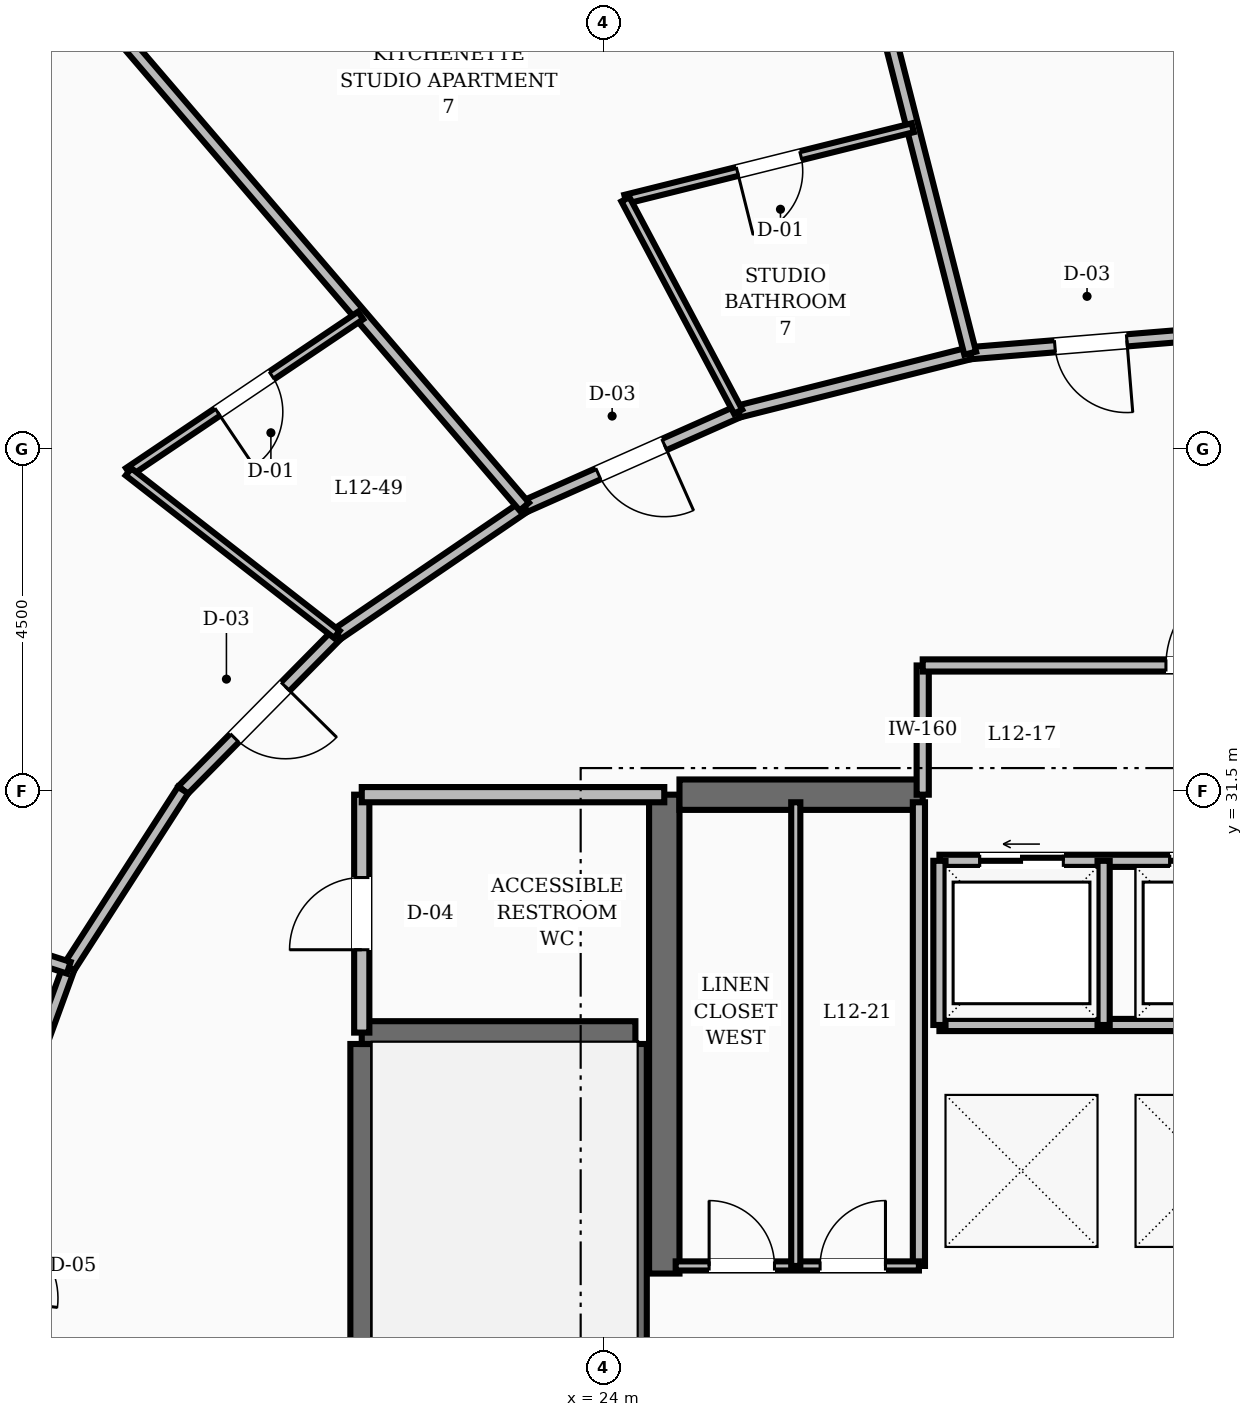
"""IFC4 building model, lengths in metres.
Left out: names, types, materials, properties, quantities, classifications, styles, units other than length and angle.
Written with IfcOpenShell. Run it as: python <this file> out.ifc"""

import sys

from ifc_helpers import new_model, si_unit, direction, frame, frame_2d, origin, place, context, subcontext, project, spatial, rectangle, extrude, element, fill, save


model = new_model("IFC4")
c1 = context("Model", 3, precision=1e-05, world=origin(), true_north=direction((0.0, 1.0)))
c2 = subcontext(c1, "Body", "Model", "MODEL_VIEW")
j1 = project(units=[si_unit("LENGTHUNIT", "METRE"), si_unit("PLANEANGLEUNIT", "RADIAN")], contexts=[c1])
p1 = place(None, origin())
s1 = spatial("IfcSite", under=j1, at=p1, CompositionType="ELEMENT")
p2 = place(p1, origin())
s2 = spatial("IfcBuilding", under=s1, at=p2, CompositionType="ELEMENT")
p3 = place(p2, frame((0.0, 0.0, 52.0)))
s3 = spatial("IfcBuildingStorey", under=s2, at=p3, CompositionType="ELEMENT", Elevation=52.0)
p4 = place(p3, frame((24.8, 25.15, 0.0), z_axis=(0.0, 0.0, 1.0), x_axis=(0.0, 1.0, 0.0)))
e1 = element("IfcWall", 1, at=p4, inside=s3, PredefinedType="SHEAR", context=c2, shape_type="SweptSolid", body=[
    extrude(rectangle(XDim=6.3, YDim=0.4, at=frame_2d((3.15, 0.0))), origin(), (0.0, 0.0, 1.0), 3.6),
])
p5 = place(p3, frame((25.0, 31.45, 0.0), z_axis=(0.0, 0.0, 1.0), x_axis=(1.0, 0.0, 0.0)))
e2 = element("IfcWall", 2, at=p5, inside=s3, PredefinedType="SHEAR", context=c2, shape_type="SweptSolid", body=[
    extrude(rectangle(XDim=3.2, YDim=0.4, at=frame_2d((1.6, 0.0))), origin(), (0.0, 0.0, 1.0), 3.6),
])
for number, where, z_axis, x_axis in (
    (3, (20.82, 19.43, 0.0), (0.0, 0.0, 1.0), (0.0, 1.0, 0.0)),
    (4, (24.42, 19.43, 0.0), (0.0, 0.0, 1.0), (0.0, 1.0, 0.0)),
):
    element("IfcWall", number, at=place(p3, frame(where, z_axis=z_axis, x_axis=x_axis)), inside=s3, PredefinedType="SHEAR", context=c2, shape_type="SweptSolid", body=[
        extrude(rectangle(XDim=8.74, YDim=0.3, at=frame_2d((4.37, 0.0))), origin(), (0.0, 0.0, 1.0), 3.6),
    ])
p6 = place(p3, frame((20.82, 28.32, 0.0), z_axis=(0.0, 0.0, 1.0), x_axis=(1.0, 0.0, 0.0)))
e5 = element("IfcWall", 5, at=p6, inside=s3, PredefinedType="SHEAR", context=c2, shape_type="SweptSolid", body=[
    extrude(rectangle(XDim=3.6, YDim=0.3, at=frame_2d((1.8, 0.0))), origin(), (0.0, 0.0, 1.0), 3.6),
])
p7 = place(p3, frame((17.291, 41.856, 0.0), z_axis=(0.0, 0.0, 1.0), x_axis=(-0.832431966359, -0.554127261, 0.0)))
e6 = element("IfcWall", 6, at=p7, inside=s3, PredefinedType="STANDARD", context=c2, shape_type="SweptSolid", body=[
    extrude(rectangle(XDim=4.82, YDim=0.28, at=frame_2d((2.41, 0.0))), origin(), (0.0, 0.0, 1.0), 2.65),
])
p8 = place(p3, frame((20.82, 28.32, 0.0), z_axis=(0.0, 0.0, 1.0), x_axis=(0.0, 1.0, 0.0)))
e7 = element("IfcWall", 7, at=p8, inside=s3, PredefinedType="SOLIDWALL", context=c2, shape_type="SweptSolid", body=[
    extrude(rectangle(XDim=3.13, YDim=0.2, at=frame_2d((1.565, 0.0))), origin(), (0.0, 0.0, 1.0), 2.61),
])
p9 = place(p8, frame((1.09, 0.0, 0.0)))
e8 = element("IfcOpeningElement", 8, at=p9, cuts=e7, PredefinedType="OPENING", context=c2, shape_type="SweptSolid", body=[
    extrude(rectangle(XDim=0.95, YDim=2.1, at=frame_2d((0.475, 1.05))), frame((0.0, 0.11, 0.0), z_axis=(0.0, -1.0, 0.0), x_axis=(1.0, 0.0, 0.0)), (0.0, 0.0, 1.0), 0.22),
])
p10 = place(p3, frame((20.82, 31.45, 0.0), z_axis=(0.0, 0.0, 1.0), x_axis=(1.0, 0.0, 0.0)))
e9 = element("IfcWall", 9, at=p10, inside=s3, PredefinedType="SOLIDWALL", context=c2, shape_type="SweptSolid", body=[
    extrude(rectangle(XDim=3.98, YDim=0.2, at=frame_2d((1.99, 0.0))), origin(), (0.0, 0.0, 1.0), 2.61),
])
p11 = place(p3, frame((28.42, 30.58, 0.0), z_axis=(0.0, 0.0, 1.0), x_axis=(1.0, 0.0, 0.0)))
e10 = element("IfcWall", 10, at=p11, inside=s3, PredefinedType="SOLIDWALL", context=c2, shape_type="SweptSolid", body=[
    extrude(rectangle(XDim=7.16, YDim=0.16, at=frame_2d((3.58, 0.0))), origin(), (0.0, 0.0, 1.0), 2.61),
])
p12 = place(p11, frame((0.53, 0.0, 0.0)))
e11 = element("IfcOpeningElement", 11, at=p12, cuts=e10, PredefinedType="OPENING", context=c2, shape_type="SweptSolid", body=[
    extrude(rectangle(XDim=1.1, YDim=2.15, at=frame_2d((0.55, 1.075))), frame((0.0, 0.09, 0.0), z_axis=(0.0, -1.0, 0.0), x_axis=(1.0, 0.0, 0.0)), (0.0, 0.0, 1.0), 0.18),
])
p13 = place(p11, frame((3.03, 0.0, 0.0)))
e12 = element("IfcOpeningElement", 12, at=p13, cuts=e10, PredefinedType="OPENING", context=c2, shape_type="SweptSolid", body=[
    extrude(rectangle(XDim=1.1, YDim=2.15, at=frame_2d((0.55, 1.075))), frame((0.0, 0.09, 0.0), z_axis=(0.0, -1.0, 0.0), x_axis=(1.0, 0.0, 0.0)), (0.0, 0.0, 1.0), 0.18),
])
p14 = place(p11, frame((5.53, 0.0, 0.0)))
e13 = element("IfcOpeningElement", 13, at=p14, cuts=e10, PredefinedType="OPENING", context=c2, shape_type="SweptSolid", body=[
    extrude(rectangle(XDim=1.1, YDim=2.15, at=frame_2d((0.55, 1.075))), frame((0.0, 0.09, 0.0), z_axis=(0.0, -1.0, 0.0), x_axis=(1.0, 0.0, 0.0)), (0.0, 0.0, 1.0), 0.18),
])
p15 = place(p3, frame((28.42, 28.42, 0.0), z_axis=(0.0, 0.0, 1.0), x_axis=(1.0, 0.0, 0.0)))
e14 = element("IfcWall", 14, at=p15, inside=s3, PredefinedType="SOLIDWALL", context=c2, shape_type="SweptSolid", body=[
    extrude(rectangle(XDim=7.16, YDim=0.16, at=frame_2d((3.58, 0.0))), origin(), (0.0, 0.0, 1.0), 2.61),
])
for number, where, z_axis, x_axis in (
    (15, (28.42, 28.42, 0.0), (0.0, 0.0, 1.0), (0.0, 1.0, 0.0)),
    (16, (30.58, 28.42, 0.0), (0.0, 0.0, 1.0), (0.0, 1.0, 0.0)),
):
    element("IfcWall", number, at=place(p3, frame(where, z_axis=z_axis, x_axis=x_axis)), inside=s3, PredefinedType="SOLIDWALL", context=c2, shape_type="SweptSolid", body=[
        extrude(rectangle(XDim=2.16, YDim=0.16, at=frame_2d((1.08, 0.0))), origin(), (0.0, 0.0, 1.0), 2.61),
    ])
p16 = place(p3, frame((28.2, 31.45, 0.0), z_axis=(0.0, 0.0, 1.0), x_axis=(0.0, 1.0, 0.0)))
e17 = element("IfcWall", 17, at=p16, inside=s3, PredefinedType="SOLIDWALL", context=c2, shape_type="SweptSolid", body=[
    extrude(rectangle(XDim=1.7, YDim=0.16, at=frame_2d((0.85, 0.0))), origin(), (0.0, 0.0, 1.0), 2.61),
])
p17 = place(p3, frame((28.2, 33.15, 0.0), z_axis=(0.0, 0.0, 1.0), x_axis=(1.0, 0.0, 0.0)))
e18 = element("IfcWall", 18, at=p17, inside=s3, PredefinedType="SOLIDWALL", context=c2, shape_type="SweptSolid", body=[
    extrude(rectangle(XDim=7.6, YDim=0.16, at=frame_2d((3.8, 0.0))), origin(), (0.0, 0.0, 1.0), 2.61),
])
p18 = place(p17, frame((3.2, 0.0, 0.0)))
e19 = element("IfcOpeningElement", 19, at=p18, cuts=e18, PredefinedType="OPENING", context=c2, shape_type="SweptSolid", body=[
    extrude(rectangle(XDim=1.2, YDim=2.1, at=frame_2d((0.6, 1.05))), frame((0.0, 0.09, 0.0), z_axis=(0.0, -1.0, 0.0), x_axis=(1.0, 0.0, 0.0)), (0.0, 0.0, 1.0), 0.18),
])
p19 = place(p3, frame((28.15, 25.25, 0.0), z_axis=(0.0, 0.0, 1.0), x_axis=(0.0, 1.0, 0.0)))
e20 = element("IfcWall", 20, at=p19, inside=s3, PredefinedType="SOLIDWALL", context=c2, shape_type="SweptSolid", body=[
    extrude(rectangle(XDim=6.1, YDim=0.16, at=frame_2d((3.05, 0.0))), origin(), (0.0, 0.0, 1.0), 2.61),
])
p20 = place(p3, frame((24.95, 25.25, 0.0), z_axis=(0.0, 0.0, 1.0), x_axis=(1.0, 0.0, 0.0)))
e21 = element("IfcWall", 21, at=p20, inside=s3, PredefinedType="PARTITIONING", context=c2, shape_type="SweptSolid", body=[
    extrude(rectangle(XDim=3.2, YDim=0.12, at=frame_2d((1.6, 0.0))), origin(), (0.0, 0.0, 1.0), 2.61),
])
p21 = place(p20, frame((0.44, 0.0, 0.0)))
e22 = element("IfcOpeningElement", 22, at=p21, cuts=e21, PredefinedType="OPENING", context=c2, shape_type="SweptSolid", body=[
    extrude(rectangle(XDim=0.86, YDim=2.1, at=frame_2d((0.43, 1.05))), frame((0.0, 0.07, 0.0), z_axis=(0.0, -1.0, 0.0), x_axis=(1.0, 0.0, 0.0)), (0.0, 0.0, 1.0), 0.14),
])
p22 = place(p20, frame((1.9, 0.0, 0.0)))
e23 = element("IfcOpeningElement", 23, at=p22, cuts=e21, PredefinedType="OPENING", context=c2, shape_type="SweptSolid", body=[
    extrude(rectangle(XDim=0.86, YDim=2.1, at=frame_2d((0.43, 1.05))), frame((0.0, 0.07, 0.0), z_axis=(0.0, -1.0, 0.0), x_axis=(1.0, 0.0, 0.0)), (0.0, 0.0, 1.0), 0.14),
])
p23 = place(p3, frame((26.53, 25.25, 0.0), z_axis=(0.0, 0.0, 1.0), x_axis=(0.0, 1.0, 0.0)))
e24 = element("IfcWall", 24, at=p23, inside=s3, PredefinedType="PARTITIONING", context=c2, shape_type="SweptSolid", body=[
    extrude(rectangle(XDim=6.1, YDim=0.12, at=frame_2d((3.05, 0.0))), origin(), (0.0, 0.0, 1.0), 2.61),
])
p24 = place(p3, frame((32.0, 37.518, 0.0), z_axis=(0.0, 0.0, 1.0), x_axis=(-0.996669377538, -0.081548463373, 0.0)))
e25 = element("IfcWall", 25, at=p24, inside=s3, PredefinedType="SOLIDWALL", context=c2, shape_type="SweptSolid", body=[
    extrude(rectangle(XDim=3.185, YDim=0.16, at=frame_2d((1.593, 0.0))), origin(), (0.0, 0.0, 1.0), 2.61),
])
p25 = place(p24, frame((1.118, 0.0, 0.0)))
e26 = element("IfcOpeningElement", 26, at=p25, cuts=e25, PredefinedType="OPENING", context=c2, shape_type="SweptSolid", body=[
    extrude(rectangle(XDim=0.95, YDim=2.1, at=frame_2d((0.475, 1.05))), frame((0.0, 0.09, 0.0), z_axis=(0.0, -1.0, 0.0), x_axis=(1.0, 0.0, 0.0)), (0.0, 0.0, 1.0), 0.18),
])
p26 = place(p3, frame((28.825, 37.258, 0.0), z_axis=(0.0, 0.0, 1.0), x_axis=(-0.969689238064, -0.244341526521, 0.0)))
e27 = element("IfcWall", 27, at=p26, inside=s3, PredefinedType="SOLIDWALL", context=c2, shape_type="SweptSolid", body=[
    extrude(rectangle(XDim=3.148, YDim=0.16, at=frame_2d((1.574, 0.0))), origin(), (0.0, 0.0, 1.0), 2.61),
])
p27 = place(p3, frame((25.772, 36.489, 0.0), z_axis=(0.0, 0.0, 1.0), x_axis=(-0.913952123493, -0.405822024984, 0.0)))
e28 = element("IfcWall", 28, at=p27, inside=s3, PredefinedType="SOLIDWALL", context=c2, shape_type="SweptSolid", body=[
    extrude(rectangle(XDim=3.078, YDim=0.16, at=frame_2d((1.539, 0.0))), origin(), (0.0, 0.0, 1.0), 2.61),
])
p28 = place(p27, frame((1.064, 0.0, 0.0)))
e29 = element("IfcOpeningElement", 29, at=p28, cuts=e28, PredefinedType="OPENING", context=c2, shape_type="SweptSolid", body=[
    extrude(rectangle(XDim=0.95, YDim=2.1, at=frame_2d((0.475, 1.05))), frame((0.0, 0.09, 0.0), z_axis=(0.0, -1.0, 0.0), x_axis=(1.0, 0.0, 0.0)), (0.0, 0.0, 1.0), 0.18),
])
p29 = place(p3, frame((22.959, 35.24, 0.0), z_axis=(0.0, 0.0, 1.0), x_axis=(-0.826293096206, -0.56324037423, 0.0)))
e30 = element("IfcWall", 30, at=p29, inside=s3, PredefinedType="SOLIDWALL", context=c2, shape_type="SweptSolid", body=[
    extrude(rectangle(XDim=2.985, YDim=0.16, at=frame_2d((1.492, 0.0))), origin(), (0.0, 0.0, 1.0), 2.61),
])
p30 = place(p3, frame((20.492, 33.559, 0.0), z_axis=(0.0, 0.0, 1.0), x_axis=(-0.702811997, -0.711375636969, 0.0)))
e31 = element("IfcWall", 31, at=p30, inside=s3, PredefinedType="SOLIDWALL", context=c2, shape_type="SweptSolid", body=[
    extrude(rectangle(XDim=2.879, YDim=0.16, at=frame_2d((1.44, 0.0))), origin(), (0.0, 0.0, 1.0), 2.61),
])
p31 = place(p30, frame((0.965, 0.0, 0.0)))
e32 = element("IfcOpeningElement", 32, at=p31, cuts=e31, PredefinedType="OPENING", context=c2, shape_type="SweptSolid", body=[
    extrude(rectangle(XDim=0.95, YDim=2.1, at=frame_2d((0.475, 1.05))), frame((0.0, 0.09, 0.0), z_axis=(0.0, -1.0, 0.0), x_axis=(1.0, 0.0, 0.0)), (0.0, 0.0, 1.0), 0.18),
])
p32 = place(p3, frame((18.469, 31.51, 0.0), z_axis=(0.0, 0.0, 1.0), x_axis=(-0.541126045017, -0.840941498206, 0.0)))
e33 = element("IfcWall", 33, at=p32, inside=s3, PredefinedType="SOLIDWALL", context=c2, shape_type="SweptSolid", body=[
    extrude(rectangle(XDim=2.779, YDim=0.16, at=frame_2d((1.39, 0.0))), origin(), (0.0, 0.0, 1.0), 2.61),
])
p33 = place(p3, frame((16.965, 29.173, 0.0), z_axis=(0.0, 0.0, 1.0), x_axis=(-0.343013437329, -0.939330496583, 0.0)))
e34 = element("IfcWall", 34, at=p33, inside=s3, PredefinedType="SOLIDWALL", context=c2, shape_type="SweptSolid", body=[
    extrude(rectangle(XDim=2.7, YDim=0.16, at=frame_2d((1.35, 0.0))), origin(), (0.0, 0.0, 1.0), 2.61),
])
p34 = place(p3, frame((28.825, 37.258, 0.0), z_axis=(0.0, 0.0, 1.0), x_axis=(-0.247097489617, 0.968990624632, 0.0)))
e35 = element("IfcWall", 35, at=p34, inside=s3, PredefinedType="SOLIDWALL", context=c2, shape_type="SweptSolid", body=[
    extrude(rectangle(XDim=8.004, YDim=0.16, at=frame_2d((4.002, 0.0))), origin(), (0.0, 0.0, 1.0), 2.61),
])
p35 = place(p3, frame((28.069, 40.224, 0.0), z_axis=(0.0, 0.0, 1.0), x_axis=(-0.970374316044, -0.241606470862, 0.0)))
e36 = element("IfcWall", 36, at=p35, inside=s3, PredefinedType="PARTITIONING", context=c2, shape_type="SweptSolid", body=[
    extrude(rectangle(XDim=3.896, YDim=0.12, at=frame_2d((1.948, 0.0))), origin(), (0.0, 0.0, 1.0), 2.61),
])
p36 = place(p35, frame((1.518, 0.0, 0.0)))
e37 = element("IfcOpeningElement", 37, at=p36, cuts=e36, PredefinedType="OPENING", context=c2, shape_type="SweptSolid", body=[
    extrude(rectangle(XDim=0.86, YDim=2.1, at=frame_2d((0.43, 1.05))), frame((0.0, 0.07, 0.0), z_axis=(0.0, -1.0, 0.0), x_axis=(1.0, 0.0, 0.0)), (0.0, 0.0, 1.0), 0.14),
])
p37 = place(p3, frame((25.772, 36.489, 0.0), z_axis=(0.0, 0.0, 1.0), x_axis=(-0.468968986747, 0.883214633863, 0.0)))
e38 = element("IfcWall", 38, at=p37, inside=s3, PredefinedType="PARTITIONING", context=c2, shape_type="SweptSolid", body=[
    extrude(rectangle(XDim=3.163, YDim=0.12, at=frame_2d((1.582, 0.0))), origin(), (0.0, 0.0, 1.0), 2.61),
])
p38 = place(p3, frame((22.959, 35.24, 0.0), z_axis=(0.0, 0.0, 1.0), x_axis=(-0.650552260828, 0.75946149075, 0.0)))
e39 = element("IfcWall", 39, at=p38, inside=s3, PredefinedType="SOLIDWALL", context=c2, shape_type="SweptSolid", body=[
    extrude(rectangle(XDim=8.662, YDim=0.16, at=frame_2d((4.331, 0.0))), origin(), (0.0, 0.0, 1.0), 2.61),
])
p39 = place(p3, frame((20.805, 37.754, 0.0), z_axis=(0.0, 0.0, 1.0), x_axis=(-0.829367953904, -0.558702780588, 0.0)))
e40 = element("IfcWall", 40, at=p39, inside=s3, PredefinedType="PARTITIONING", context=c2, shape_type="SweptSolid", body=[
    extrude(rectangle(XDim=3.682, YDim=0.12, at=frame_2d((1.841, 0.0))), origin(), (0.0, 0.0, 1.0), 2.61),
])
p40 = place(p39, frame((1.411, 0.0, 0.0)))
e41 = element("IfcOpeningElement", 41, at=p40, cuts=e40, PredefinedType="OPENING", context=c2, shape_type="SweptSolid", body=[
    extrude(rectangle(XDim=0.86, YDim=2.1, at=frame_2d((0.43, 1.05))), frame((0.0, 0.07, 0.0), z_axis=(0.0, -1.0, 0.0), x_axis=(1.0, 0.0, 0.0)), (0.0, 0.0, 1.0), 0.14),
])
p41 = place(p3, frame((20.492, 33.559, 0.0), z_axis=(0.0, 0.0, 1.0), x_axis=(-0.788470290208, 0.615072842401, 0.0)))
e42 = element("IfcWall", 42, at=p41, inside=s3, PredefinedType="PARTITIONING", context=c2, shape_type="SweptSolid", body=[
    extrude(rectangle(XDim=3.476, YDim=0.12, at=frame_2d((1.738, 0.0))), origin(), (0.0, 0.0, 1.0), 2.61),
])
p42 = place(p3, frame((16.965, 29.173, 0.0), z_axis=(0.0, 0.0, 1.0), x_axis=(-0.951563741072, 0.307451535492, 0.0)))
e43 = element("IfcWall", 43, at=p42, inside=s3, PredefinedType="SOLIDWALL", context=c2, shape_type="SweptSolid", body=[
    extrude(rectangle(XDim=9.854, YDim=0.16, at=frame_2d((4.927, 0.0))), origin(), (0.0, 0.0, 1.0), 2.61),
])
p43 = place(p9, origin())
e44 = element("IfcDoor", 44, at=p43, inside=s3, OperationType="SINGLE_SWING_LEFT", PredefinedType="DOOR", context=c2, shape_type="SweptSolid", body=[
    extrude(rectangle(XDim=0.95, YDim=2.1, at=frame_2d((0.475, 1.05))), frame((0.0, 0.025, 0.0), z_axis=(0.0, -1.0, 0.0), x_axis=(1.0, 0.0, 0.0)), (0.0, 0.0, 1.0), 0.05),
])
fill(e8, e44)
p44 = place(p12, origin())
e45 = element("IfcDoor", 45, at=p44, inside=s3, OperationType="SLIDING_TO_LEFT", PredefinedType="DOOR", context=c2, shape_type="SweptSolid", body=[
    extrude(rectangle(XDim=1.1, YDim=2.15, at=frame_2d((0.55, 1.075))), frame((0.0, 0.025, 0.0), z_axis=(0.0, -1.0, 0.0), x_axis=(1.0, 0.0, 0.0)), (0.0, 0.0, 1.0), 0.05),
])
fill(e11, e45)
p45 = place(p13, origin())
e46 = element("IfcDoor", 46, at=p45, inside=s3, OperationType="SLIDING_TO_LEFT", PredefinedType="DOOR", context=c2, shape_type="SweptSolid", body=[
    extrude(rectangle(XDim=1.1, YDim=2.15, at=frame_2d((0.55, 1.075))), frame((0.0, 0.025, 0.0), z_axis=(0.0, -1.0, 0.0), x_axis=(1.0, 0.0, 0.0)), (0.0, 0.0, 1.0), 0.05),
])
fill(e12, e46)
p46 = place(p18, origin())
e47 = element("IfcDoor", 47, at=p46, inside=s3, OperationType="SINGLE_SWING_RIGHT", PredefinedType="DOOR", context=c2, shape_type="SweptSolid", body=[
    extrude(rectangle(XDim=1.2, YDim=2.1, at=frame_2d((0.6, 1.05))), frame((0.0, 0.025, 0.0), z_axis=(0.0, -1.0, 0.0), x_axis=(1.0, 0.0, 0.0)), (0.0, 0.0, 1.0), 0.05),
])
fill(e19, e47)
p47 = place(p21, origin())
e48 = element("IfcDoor", 48, at=p47, inside=s3, OperationType="SINGLE_SWING_LEFT", PredefinedType="DOOR", context=c2, shape_type="SweptSolid", body=[
    extrude(rectangle(XDim=0.86, YDim=2.1, at=frame_2d((0.43, 1.05))), frame((0.0, 0.025, 0.0), z_axis=(0.0, -1.0, 0.0), x_axis=(1.0, 0.0, 0.0)), (0.0, 0.0, 1.0), 0.05),
])
fill(e22, e48)
p48 = place(p22, origin())
e49 = element("IfcDoor", 49, at=p48, inside=s3, OperationType="SINGLE_SWING_RIGHT", PredefinedType="DOOR", context=c2, shape_type="SweptSolid", body=[
    extrude(rectangle(XDim=0.86, YDim=2.1, at=frame_2d((0.43, 1.05))), frame((0.0, 0.025, 0.0), z_axis=(0.0, -1.0, 0.0), x_axis=(1.0, 0.0, 0.0)), (0.0, 0.0, 1.0), 0.05),
])
fill(e23, e49)
p49 = place(p25, origin())
e50 = element("IfcDoor", 50, at=p49, inside=s3, OperationType="SINGLE_SWING_LEFT", PredefinedType="DOOR", context=c2, shape_type="SweptSolid", body=[
    extrude(rectangle(XDim=0.95, YDim=2.1, at=frame_2d((0.475, 1.05))), frame((0.0, 0.025, 0.0), z_axis=(0.0, -1.0, 0.0), x_axis=(1.0, 0.0, 0.0)), (0.0, 0.0, 1.0), 0.05),
])
fill(e26, e50)
p50 = place(p36, origin())
e51 = element("IfcDoor", 51, at=p50, inside=s3, OperationType="SINGLE_SWING_RIGHT", PredefinedType="DOOR", context=c2, shape_type="SweptSolid", body=[
    extrude(rectangle(XDim=0.86, YDim=2.1, at=frame_2d((0.43, 1.05))), frame((0.0, 0.025, 0.0), z_axis=(0.0, -1.0, 0.0), x_axis=(1.0, 0.0, 0.0)), (0.0, 0.0, 1.0), 0.05),
])
fill(e37, e51)
p51 = place(p28, origin())
e52 = element("IfcDoor", 52, at=p51, inside=s3, OperationType="SINGLE_SWING_LEFT", PredefinedType="DOOR", context=c2, shape_type="SweptSolid", body=[
    extrude(rectangle(XDim=0.95, YDim=2.1, at=frame_2d((0.475, 1.05))), frame((0.0, 0.025, 0.0), z_axis=(0.0, -1.0, 0.0), x_axis=(1.0, 0.0, 0.0)), (0.0, 0.0, 1.0), 0.05),
])
fill(e29, e52)
p52 = place(p40, origin())
e53 = element("IfcDoor", 53, at=p52, inside=s3, OperationType="SINGLE_SWING_RIGHT", PredefinedType="DOOR", context=c2, shape_type="SweptSolid", body=[
    extrude(rectangle(XDim=0.86, YDim=2.1, at=frame_2d((0.43, 1.05))), frame((0.0, 0.025, 0.0), z_axis=(0.0, -1.0, 0.0), x_axis=(1.0, 0.0, 0.0)), (0.0, 0.0, 1.0), 0.05),
])
fill(e41, e53)
p53 = place(p31, origin())
e54 = element("IfcDoor", 54, at=p53, inside=s3, OperationType="SINGLE_SWING_LEFT", PredefinedType="DOOR", context=c2, shape_type="SweptSolid", body=[
    extrude(rectangle(XDim=0.95, YDim=2.1, at=frame_2d((0.475, 1.05))), frame((0.0, 0.025, 0.0), z_axis=(0.0, -1.0, 0.0), x_axis=(1.0, 0.0, 0.0)), (0.0, 0.0, 1.0), 0.05),
])
fill(e32, e54)
save(model, sys.argv[1])
